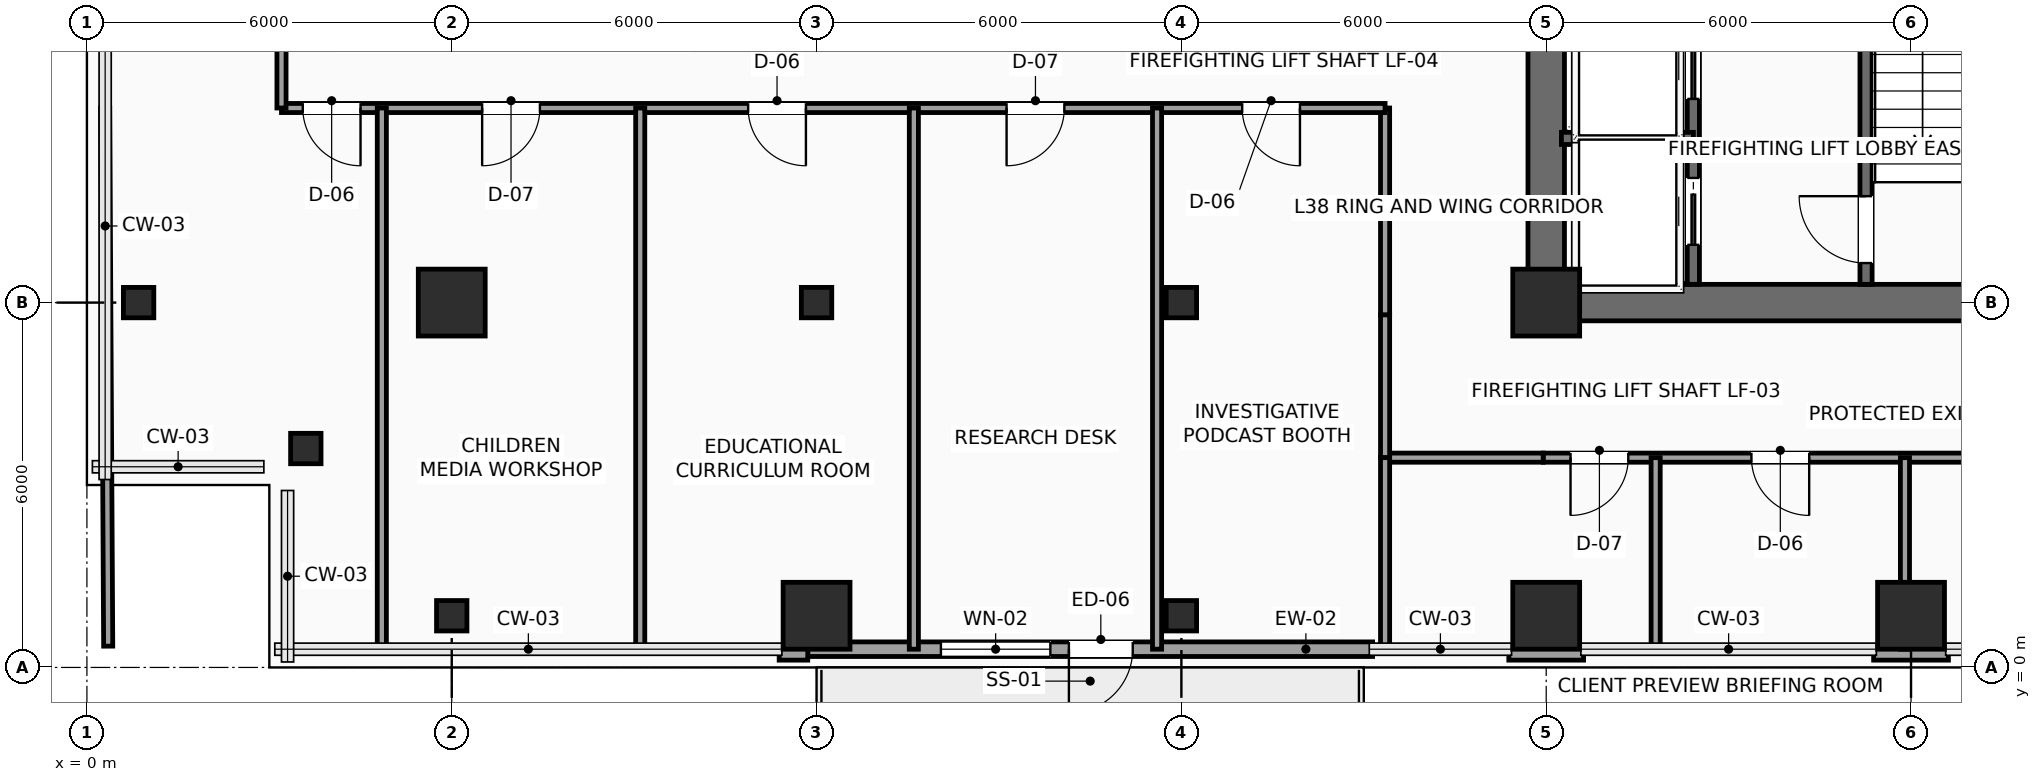
"""IFC4 building model, lengths in metres.
Left out: names, types, materials, properties, quantities, classifications, styles, units other than length and angle.
Written with IfcOpenShell. Run it as: python <this file> out.ifc"""

import sys

from ifc_helpers import new_model, si_unit, direction, frame, frame_2d, origin, origin_2d, place, context, subcontext, project, spatial, rectangle, hollow_rectangle, extrude, element, fill, save


model = new_model("IFC4")
c1 = context("Model", 3, precision=1e-05, world=origin(), true_north=direction((0.0, 1.0)))
c2 = subcontext(c1, "Body", "Model", "MODEL_VIEW")
j1 = project(units=[si_unit("LENGTHUNIT", "METRE"), si_unit("PLANEANGLEUNIT", "RADIAN")], contexts=[c1])
p1 = place(None, origin())
s1 = spatial("IfcSite", under=j1, at=p1, CompositionType="ELEMENT")
p2 = place(p1, origin())
s2 = spatial("IfcBuilding", under=s1, at=p2, CompositionType="ELEMENT")
p3 = place(p2, frame((0.0, 0.0, 156.9)))
s3 = spatial("IfcBuildingStorey", under=s2, at=p3, CompositionType="ELEMENT", Elevation=156.9)
p4 = place(p3, frame((24.0, 6.0, 0.0), z_axis=(0.0, 0.0, 1.0), x_axis=(1.0, 0.0, 0.0)))
e1 = element("IfcColumn", 1, at=p4, inside=s3, PredefinedType="COLUMN", context=c2, shape_type="SweptSolid", body=[
    extrude(rectangle(XDim=1.1, YDim=1.1, at=origin_2d()), origin(), (0.0, 0.0, 1.0), 3.75),
])
for number, where, z_axis, x_axis in (
    (2, (3.6, 3.6, 0.0), (0.0, 0.0, 1.0), (1.0, 0.0, 0.0)),
    (3, (0.85, 6.0, 0.0), (0.0, 0.0, 1.0), (1.0, 0.0, 0.0)),
    (4, (6.0, 0.85, 0.0), (0.0, 0.0, 1.0), (1.0, 0.0, 0.0)),
):
    element("IfcColumn", number, at=place(p3, frame(where, z_axis=z_axis, x_axis=x_axis)), inside=s3, PredefinedType="COLUMN", context=c2, shape_type="SweptSolid", body=[
        extrude(hollow_rectangle(XDim=0.5, YDim=0.5, WallThickness=0.025, InnerFilletRadius=0.025, OuterFilletRadius=0.04, at=origin_2d()), origin(), (0.0, 0.0, 1.0), 3.75),
    ])
for number, where, z_axis, x_axis in (
    (5, (6.0, 6.0, 0.0), (0.0, 0.0, 1.0), (1.0, 0.0, 0.0)),
    (6, (12.0, 0.85, 0.0), (0.0, 0.0, 1.0), (1.0, 0.0, 0.0)),
):
    element("IfcColumn", number, at=place(p3, frame(where, z_axis=z_axis, x_axis=x_axis)), inside=s3, PredefinedType="COLUMN", context=c2, shape_type="SweptSolid", body=[
        extrude(rectangle(XDim=1.1, YDim=1.1, at=origin_2d()), origin(), (0.0, 0.0, 1.0), 3.75),
    ])
for number, where, z_axis, x_axis in (
    (7, (12.0, 6.0, 0.0), (0.0, 0.0, 1.0), (1.0, 0.0, 0.0)),
    (8, (18.0, 0.85, 0.0), (0.0, 0.0, 1.0), (1.0, 0.0, 0.0)),
    (9, (18.0, 6.0, 0.0), (0.0, 0.0, 1.0), (1.0, 0.0, 0.0)),
):
    element("IfcColumn", number, at=place(p3, frame(where, z_axis=z_axis, x_axis=x_axis)), inside=s3, PredefinedType="COLUMN", context=c2, shape_type="SweptSolid", body=[
        extrude(hollow_rectangle(XDim=0.5, YDim=0.5, WallThickness=0.025, InnerFilletRadius=0.025, OuterFilletRadius=0.04, at=origin_2d()), origin(), (0.0, 0.0, 1.0), 3.75),
    ])
for number, where, z_axis, x_axis in (
    (10, (24.0, 0.85, 0.0), (0.0, 0.0, 1.0), (1.0, 0.0, 0.0)),
    (11, (30.0, 0.85, 0.0), (0.0, 0.0, 1.0), (1.0, 0.0, 0.0)),
):
    element("IfcColumn", number, at=place(p3, frame(where, z_axis=z_axis, x_axis=x_axis)), inside=s3, PredefinedType="COLUMN", context=c2, shape_type="SweptSolid", body=[
        extrude(rectangle(XDim=1.1, YDim=1.1, at=origin_2d()), origin(), (0.0, 0.0, 1.0), 3.75),
    ])
p5 = place(p3, frame((21.145, 0.3, 0.0), z_axis=(0.0, 0.0, 1.0), x_axis=(-1.0, 0.0, 0.0)))
e12 = element("IfcWall", 12, at=p5, inside=s3, PredefinedType="SOLIDWALL", context=c2, shape_type="SweptSolid", body=[
    extrude(rectangle(XDim=9.29, YDim=0.24, at=frame_2d((4.645, 0.0))), origin(), (0.0, 0.0, 1.0), 3.525),
])
p6 = place(p5, frame((3.945, 0.0, 0.0)))
e13 = element("IfcOpeningElement", 13, at=p6, cuts=e12, PredefinedType="OPENING", context=c2, shape_type="SweptSolid", body=[
    extrude(rectangle(XDim=1.05, YDim=2.2, at=frame_2d((0.525, 1.1))), frame((0.0, 0.13, 0.0), z_axis=(0.0, -1.0, 0.0), x_axis=(1.0, 0.0, 0.0)), (0.0, 0.0, 1.0), 0.26),
])
p7 = place(p5, frame((5.3, 0.0, 0.85)))
e14 = element("IfcOpeningElement", 14, at=p7, cuts=e12, PredefinedType="OPENING", context=c2, shape_type="SweptSolid", body=[
    extrude(rectangle(XDim=1.8, YDim=2.1, at=frame_2d((0.9, 1.05))), frame((0.0, 0.13, 0.0), z_axis=(0.0, -1.0, 0.0), x_axis=(1.0, 0.0, 0.0)), (0.0, 0.0, 1.0), 0.26),
])
for number, where, z_axis, x_axis in (
    (15, (30.615, 0.24, 0.0), (0.0, 0.0, 1.0), (-1.0, 0.0, 0.0)),
    (16, (24.615, 0.24, 0.0), (0.0, 0.0, 1.0), (-1.0, 0.0, 0.0)),
):
    element("IfcWall", number, at=place(p3, frame(where, z_axis=z_axis, x_axis=x_axis)), inside=s3, PredefinedType="SOLIDWALL", context=c2, shape_type="SweptSolid", body=[
        extrude(rectangle(XDim=1.23, YDim=0.24, at=frame_2d((0.615, 0.0))), origin(), (0.0, 0.0, 1.0), 3.525),
    ])
p8 = place(p3, frame((11.855, 0.24, 0.0), z_axis=(0.0, 0.0, 1.0), x_axis=(-1.0, 0.0, 0.0)))
e17 = element("IfcWall", 17, at=p8, inside=s3, PredefinedType="SOLIDWALL", context=c2, shape_type="SweptSolid", body=[
    extrude(rectangle(XDim=0.47, YDim=0.24, at=frame_2d((0.235, 0.0))), origin(), (0.0, 0.0, 1.0), 3.525),
])
p9 = place(p3, frame((24.0, 6.0, 0.0), z_axis=(0.0, 0.0, 1.0), x_axis=(1.0, 0.0, 0.0)))
e18 = element("IfcWall", 18, at=p9, inside=s3, PredefinedType="SHEAR", context=c2, shape_type="SweptSolid", body=[
    extrude(rectangle(XDim=9.6, YDim=0.6, at=frame_2d((4.8, 0.0))), origin(), (0.0, 0.0, 1.0), 3.525),
])
p10 = place(p3, frame((24.0, 6.0, 0.0), z_axis=(0.0, 0.0, 1.0), x_axis=(0.0, 1.0, 0.0)))
e19 = element("IfcWall", 19, at=p10, inside=s3, PredefinedType="SHEAR", context=c2, shape_type="SweptSolid", body=[
    extrude(rectangle(XDim=12.0, YDim=0.6, at=frame_2d((6.0, 0.0))), origin(), (0.0, 0.0, 1.0), 3.525),
])
p11 = place(p10, frame((7.15, 0.0, 0.0)))
e20 = element("IfcOpeningElement", 20, at=p11, cuts=e19, PredefinedType="OPENING", context=c2, shape_type="SweptSolid", body=[
    extrude(rectangle(XDim=1.6, YDim=2.3, at=frame_2d((0.8, 1.15))), frame((0.0, 0.31, 0.0), z_axis=(0.0, -1.0, 0.0), x_axis=(1.0, 0.0, 0.0)), (0.0, 0.0, 1.0), 0.62),
])
p12 = place(p3, frame((29.26, 6.3, 0.0), z_axis=(0.0, 0.0, 1.0), x_axis=(0.0, 1.0, 0.0)))
e21 = element("IfcWall", 21, at=p12, inside=s3, PredefinedType="SHEAR", context=c2, shape_type="SweptSolid", body=[
    extrude(rectangle(XDim=8.88, YDim=0.2, at=frame_2d((4.44, 0.0))), origin(), (0.0, 0.0, 1.0), 3.525),
])
p13 = place(p12, frame((0.35, 0.0, 0.0)))
e22 = element("IfcOpeningElement", 22, at=p13, cuts=e21, PredefinedType="OPENING", context=c2, shape_type="SweptSolid", body=[
    extrude(rectangle(XDim=1.1, YDim=2.2, at=frame_2d((0.55, 1.1))), frame((0.0, 0.11, 0.0), z_axis=(0.0, -1.0, 0.0), x_axis=(1.0, 0.0, 0.0)), (0.0, 0.0, 1.0), 0.22),
])
p14 = place(p3, frame((26.42, 6.3, 0.0), z_axis=(0.0, 0.0, 1.0), x_axis=(0.0, 1.0, 0.0)))
e23 = element("IfcWall", 23, at=p14, inside=s3, PredefinedType="SHEAR", context=c2, shape_type="SweptSolid", body=[
    extrude(rectangle(XDim=4.95, YDim=0.2, at=frame_2d((2.475, 0.0))), origin(), (0.0, 0.0, 1.0), 3.525),
])
p15 = place(p14, frame((0.65, 0.0, 0.0)))
e24 = element("IfcOpeningElement", 24, at=p15, cuts=e23, PredefinedType="OPENING", context=c2, shape_type="SweptSolid", body=[
    extrude(rectangle(XDim=1.1, YDim=2.2, at=frame_2d((0.55, 1.1))), frame((0.0, 0.11, 0.0), z_axis=(0.0, -1.0, 0.0), x_axis=(1.0, 0.0, 0.0)), (0.0, 0.0, 1.0), 0.22),
])
p16 = place(p14, frame((3.05, 0.0, 0.0)))
e25 = element("IfcOpeningElement", 25, at=p16, cuts=e23, PredefinedType="OPENING", context=c2, shape_type="SweptSolid", body=[
    extrude(rectangle(XDim=1.1, YDim=2.2, at=frame_2d((0.55, 1.1))), frame((0.0, 0.11, 0.0), z_axis=(0.0, -1.0, 0.0), x_axis=(1.0, 0.0, 0.0)), (0.0, 0.0, 1.0), 0.22),
])
p17 = place(p3, frame((24.25, 8.7, 0.0), z_axis=(0.0, 0.0, 1.0), x_axis=(1.0, 0.0, 0.0)))
e26 = element("IfcWall", 26, at=p17, inside=s3, PredefinedType="SHEAR", context=c2, shape_type="SweptSolid", body=[
    extrude(rectangle(XDim=2.17, YDim=0.2, at=frame_2d((1.085, 0.0))), origin(), (0.0, 0.0, 1.0), 3.525),
])
p18 = place(p3, frame((36.15, 3.45, 0.0), z_axis=(0.0, 0.0, 1.0), x_axis=(-1.0, 0.0, 0.0)))
e27 = element("IfcWall", 27, at=p18, inside=s3, PredefinedType="PARTITIONING", context=c2, shape_type="SweptSolid", body=[
    extrude(rectangle(XDim=12.2, YDim=0.15, at=frame_2d((6.1, 0.0))), origin(), (0.0, 0.0, 1.0), 3.067),
])
p19 = place(p18, frame((10.8, 0.0, 0.0)))
e28 = element("IfcOpeningElement", 28, at=p19, cuts=e27, PredefinedType="OPENING", context=c2, shape_type="SweptSolid", body=[
    extrude(rectangle(XDim=0.95, YDim=2.15, at=frame_2d((0.475, 1.075))), frame((0.0, 0.085, 0.0), z_axis=(0.0, -1.0, 0.0), x_axis=(1.0, 0.0, 0.0)), (0.0, 0.0, 1.0), 0.17),
])
p20 = place(p18, frame((7.825, 0.0, 0.0)))
e29 = element("IfcOpeningElement", 29, at=p20, cuts=e27, PredefinedType="OPENING", context=c2, shape_type="SweptSolid", body=[
    extrude(rectangle(XDim=0.95, YDim=2.15, at=frame_2d((0.475, 1.075))), frame((0.0, 0.085, 0.0), z_axis=(0.0, -1.0, 0.0), x_axis=(1.0, 0.0, 0.0)), (0.0, 0.0, 1.0), 0.17),
])
p21 = place(p18, frame((3.675, 0.0, 0.0)))
e30 = element("IfcOpeningElement", 30, at=p21, cuts=e27, PredefinedType="OPENING", context=c2, shape_type="SweptSolid", body=[
    extrude(rectangle(XDim=0.95, YDim=2.15, at=frame_2d((0.475, 1.075))), frame((0.0, 0.085, 0.0), z_axis=(0.0, -1.0, 0.0), x_axis=(1.0, 0.0, 0.0)), (0.0, 0.0, 1.0), 0.17),
])
p22 = place(p3, frame((23.95, 3.45, 0.0), z_axis=(0.0, 0.0, 1.0), x_axis=(-1.0, 0.0, 0.0)))
e31 = element("IfcWall", 31, at=p22, inside=s3, PredefinedType="PARTITIONING", context=c2, shape_type="SweptSolid", body=[
    extrude(rectangle(XDim=2.6, YDim=0.15, at=frame_2d((1.3, 0.0))), origin(), (0.0, 0.0, 1.0), 3.067),
])
p23 = place(p3, frame((21.35, 3.45, 0.0), z_axis=(0.0, 0.0, 1.0), x_axis=(0.0, 1.0, 0.0)))
e32 = element("IfcWall", 32, at=p23, inside=s3, PredefinedType="PARTITIONING", context=c2, shape_type="SweptSolid", body=[
    extrude(rectangle(XDim=2.35, YDim=0.15, at=frame_2d((1.175, 0.0))), origin(), (0.0, 0.0, 1.0), 3.525),
])
p24 = place(p3, frame((21.35, 5.8, 0.0), z_axis=(0.0, 0.0, 1.0), x_axis=(0.0, 1.0, 0.0)))
e33 = element("IfcWall", 33, at=p24, inside=s3, PredefinedType="PARTITIONING", context=c2, shape_type="SweptSolid", body=[
    extrude(rectangle(XDim=3.4, YDim=0.15, at=frame_2d((1.7, 0.0))), origin(), (0.0, 0.0, 1.0), 3.525),
])
p25 = place(p3, frame((21.35, 9.2, 0.0), z_axis=(0.0, 0.0, 1.0), x_axis=(-1.0, 0.0, 0.0)))
e34 = element("IfcWall", 34, at=p25, inside=s3, PredefinedType="PARTITIONING", context=c2, shape_type="SweptSolid", body=[
    extrude(rectangle(XDim=18.15, YDim=0.15, at=frame_2d((9.075, 0.0))), origin(), (0.0, 0.0, 1.0), 3.067),
])
p26 = place(p25, frame((16.85, 0.0, 0.0)))
e35 = element("IfcOpeningElement", 35, at=p26, cuts=e34, PredefinedType="OPENING", context=c2, shape_type="SweptSolid", body=[
    extrude(rectangle(XDim=0.95, YDim=2.15, at=frame_2d((0.475, 1.075))), frame((0.0, 0.085, 0.0), z_axis=(0.0, -1.0, 0.0), x_axis=(1.0, 0.0, 0.0)), (0.0, 0.0, 1.0), 0.17),
])
p27 = place(p25, frame((13.9, 0.0, 0.0)))
e36 = element("IfcOpeningElement", 36, at=p27, cuts=e34, PredefinedType="OPENING", context=c2, shape_type="SweptSolid", body=[
    extrude(rectangle(XDim=0.95, YDim=2.15, at=frame_2d((0.475, 1.075))), frame((0.0, 0.085, 0.0), z_axis=(0.0, -1.0, 0.0), x_axis=(1.0, 0.0, 0.0)), (0.0, 0.0, 1.0), 0.17),
])
p28 = place(p25, frame((9.525, 0.0, 0.0)))
e37 = element("IfcOpeningElement", 37, at=p28, cuts=e34, PredefinedType="OPENING", context=c2, shape_type="SweptSolid", body=[
    extrude(rectangle(XDim=0.95, YDim=2.15, at=frame_2d((0.475, 1.075))), frame((0.0, 0.085, 0.0), z_axis=(0.0, -1.0, 0.0), x_axis=(1.0, 0.0, 0.0)), (0.0, 0.0, 1.0), 0.17),
])
p29 = place(p25, frame((5.275, 0.0, 0.0)))
e38 = element("IfcOpeningElement", 38, at=p29, cuts=e34, PredefinedType="OPENING", context=c2, shape_type="SweptSolid", body=[
    extrude(rectangle(XDim=0.95, YDim=2.15, at=frame_2d((0.475, 1.075))), frame((0.0, 0.085, 0.0), z_axis=(0.0, -1.0, 0.0), x_axis=(1.0, 0.0, 0.0)), (0.0, 0.0, 1.0), 0.17),
])
p30 = place(p25, frame((1.4, 0.0, 0.0)))
e39 = element("IfcOpeningElement", 39, at=p30, cuts=e34, PredefinedType="OPENING", context=c2, shape_type="SweptSolid", body=[
    extrude(rectangle(XDim=0.95, YDim=2.15, at=frame_2d((0.475, 1.075))), frame((0.0, 0.085, 0.0), z_axis=(0.0, -1.0, 0.0), x_axis=(1.0, 0.0, 0.0)), (0.0, 0.0, 1.0), 0.17),
])
p31 = place(p3, frame((3.2, 9.2, 0.0), z_axis=(0.0, 0.0, 1.0), x_axis=(0.0, 1.0, 0.0)))
e40 = element("IfcWall", 40, at=p31, inside=s3, PredefinedType="PARTITIONING", context=c2, shape_type="SweptSolid", body=[
    extrude(rectangle(XDim=2.05, YDim=0.15, at=frame_2d((1.025, 0.0))), origin(), (0.0, 0.0, 1.0), 3.525),
])
for number, where, z_axis, x_axis in (
    (41, (21.35, 0.3, 0.0), (0.0, 0.0, 1.0), (0.0, 1.0, 0.0)),
    (42, (25.8, 0.3, 0.0), (0.0, 0.0, 1.0), (0.0, 1.0, 0.0)),
    (43, (29.9, 0.3, 0.0), (0.0, 0.0, 1.0), (0.0, 1.0, 0.0)),
):
    element("IfcWall", number, at=place(p3, frame(where, z_axis=z_axis, x_axis=x_axis)), inside=s3, PredefinedType="PARTITIONING", context=c2, shape_type="SweptSolid", body=[
        extrude(rectangle(XDim=3.15, YDim=0.15, at=frame_2d((1.575, 0.0))), origin(), (0.0, 0.0, 1.0), 3.525),
    ])
p32 = place(p3, frame((0.35, 0.35, 0.0), z_axis=(0.0, 0.0, 1.0), x_axis=(-0.005655237989, 0.999984009014, 0.0)))
e44 = element("IfcWall", 44, at=p32, inside=s3, PredefinedType="PARTITIONING", context=c2, shape_type="SweptSolid", body=[
    extrude(rectangle(XDim=8.85, YDim=0.15, at=frame_2d((4.425, 0.0))), origin(), (0.0, 0.0, 1.0), 3.525),
])
for number, where, z_axis, x_axis in (
    (45, (4.85, 0.3, 0.0), (0.0, 0.0, 1.0), (0.0, 1.0, 0.0)),
    (46, (9.1, 0.3, 0.0), (0.0, 0.0, 1.0), (0.0, 1.0, 0.0)),
    (47, (13.6, 0.3, 0.0), (0.0, 0.0, 1.0), (0.0, 1.0, 0.0)),
    (48, (17.6, 0.3, 0.0), (0.0, 0.0, 1.0), (0.0, 1.0, 0.0)),
):
    element("IfcWall", number, at=place(p3, frame(where, z_axis=z_axis, x_axis=x_axis)), inside=s3, PredefinedType="PARTITIONING", context=c2, shape_type="SweptSolid", body=[
        extrude(rectangle(XDim=8.9, YDim=0.15, at=frame_2d((4.45, 0.0))), origin(), (0.0, 0.0, 1.0), 3.525),
    ])
p33 = place(p6, origin())
e49 = element("IfcDoor", 49, at=p33, inside=s3, OperationType="SINGLE_SWING_RIGHT", PredefinedType="DOOR", context=c2, shape_type="SweptSolid", body=[
    extrude(rectangle(XDim=1.05, YDim=2.2, at=frame_2d((0.525, 1.1))), frame((0.0, 0.025, 0.0), z_axis=(0.0, -1.0, 0.0), x_axis=(1.0, 0.0, 0.0)), (0.0, 0.0, 1.0), 0.05),
])
fill(e13, e49)
p34 = place(p7, origin())
e50 = element("IfcWindow", 50, at=p34, inside=s3, PartitioningType="SINGLE_PANEL", PredefinedType="WINDOW", context=c2, shape_type="SweptSolid", body=[
    extrude(rectangle(XDim=1.8, YDim=2.1, at=frame_2d((0.9, 1.05))), frame((0.0, 0.03, 0.0), z_axis=(0.0, -1.0, 0.0), x_axis=(1.0, 0.0, 0.0)), (0.0, 0.0, 1.0), 0.06),
])
fill(e14, e50)
p35 = place(p13, origin())
e51 = element("IfcDoor", 51, at=p35, inside=s3, OperationType="SINGLE_SWING_RIGHT", PredefinedType="DOOR", context=c2, shape_type="SweptSolid", body=[
    extrude(rectangle(XDim=1.1, YDim=2.2, at=frame_2d((0.55, 1.1))), frame((0.0, 0.025, 0.0), z_axis=(0.0, -1.0, 0.0), x_axis=(1.0, 0.0, 0.0)), (0.0, 0.0, 1.0), 0.05),
])
fill(e22, e51)
p36 = place(p15, origin())
e52 = element("IfcDoor", 52, at=p36, inside=s3, OperationType="SLIDING_TO_LEFT", PredefinedType="DOOR", context=c2, shape_type="SweptSolid", body=[
    extrude(rectangle(XDim=1.1, YDim=2.2, at=frame_2d((0.55, 1.1))), frame((0.0, 0.025, 0.0), z_axis=(0.0, -1.0, 0.0), x_axis=(1.0, 0.0, 0.0)), (0.0, 0.0, 1.0), 0.05),
])
fill(e24, e52)
p37 = place(p16, origin())
e53 = element("IfcDoor", 53, at=p37, inside=s3, OperationType="SLIDING_TO_LEFT", PredefinedType="DOOR", context=c2, shape_type="SweptSolid", body=[
    extrude(rectangle(XDim=1.1, YDim=2.2, at=frame_2d((0.55, 1.1))), frame((0.0, 0.025, 0.0), z_axis=(0.0, -1.0, 0.0), x_axis=(1.0, 0.0, 0.0)), (0.0, 0.0, 1.0), 0.05),
])
fill(e25, e53)
p38 = place(p19, origin())
e54 = element("IfcDoor", 54, at=p38, inside=s3, OperationType="SINGLE_SWING_RIGHT", PredefinedType="DOOR", context=c2, shape_type="SweptSolid", body=[
    extrude(rectangle(XDim=0.95, YDim=2.15, at=frame_2d((0.475, 1.075))), frame((0.0, 0.025, 0.0), z_axis=(0.0, -1.0, 0.0), x_axis=(1.0, 0.0, 0.0)), (0.0, 0.0, 1.0), 0.05),
])
fill(e28, e54)
p39 = place(p20, origin())
e55 = element("IfcDoor", 55, at=p39, inside=s3, OperationType="SINGLE_SWING_LEFT", PredefinedType="DOOR", context=c2, shape_type="SweptSolid", body=[
    extrude(rectangle(XDim=0.95, YDim=2.15, at=frame_2d((0.475, 1.075))), frame((0.0, 0.025, 0.0), z_axis=(0.0, -1.0, 0.0), x_axis=(1.0, 0.0, 0.0)), (0.0, 0.0, 1.0), 0.05),
])
fill(e29, e55)
p40 = place(p26, origin())
e56 = element("IfcDoor", 56, at=p40, inside=s3, OperationType="SINGLE_SWING_LEFT", PredefinedType="DOOR", context=c2, shape_type="SweptSolid", body=[
    extrude(rectangle(XDim=0.95, YDim=2.15, at=frame_2d((0.475, 1.075))), frame((0.0, 0.025, 0.0), z_axis=(0.0, -1.0, 0.0), x_axis=(1.0, 0.0, 0.0)), (0.0, 0.0, 1.0), 0.05),
])
fill(e35, e56)
p41 = place(p27, origin())
e57 = element("IfcDoor", 57, at=p41, inside=s3, OperationType="SINGLE_SWING_RIGHT", PredefinedType="DOOR", context=c2, shape_type="SweptSolid", body=[
    extrude(rectangle(XDim=0.95, YDim=2.15, at=frame_2d((0.475, 1.075))), frame((0.0, 0.025, 0.0), z_axis=(0.0, -1.0, 0.0), x_axis=(1.0, 0.0, 0.0)), (0.0, 0.0, 1.0), 0.05),
])
fill(e36, e57)
p42 = place(p28, origin())
e58 = element("IfcDoor", 58, at=p42, inside=s3, OperationType="SINGLE_SWING_LEFT", PredefinedType="DOOR", context=c2, shape_type="SweptSolid", body=[
    extrude(rectangle(XDim=0.95, YDim=2.15, at=frame_2d((0.475, 1.075))), frame((0.0, 0.025, 0.0), z_axis=(0.0, -1.0, 0.0), x_axis=(1.0, 0.0, 0.0)), (0.0, 0.0, 1.0), 0.05),
])
fill(e37, e58)
p43 = place(p29, origin())
e59 = element("IfcDoor", 59, at=p43, inside=s3, OperationType="SINGLE_SWING_RIGHT", PredefinedType="DOOR", context=c2, shape_type="SweptSolid", body=[
    extrude(rectangle(XDim=0.95, YDim=2.15, at=frame_2d((0.475, 1.075))), frame((0.0, 0.025, 0.0), z_axis=(0.0, -1.0, 0.0), x_axis=(1.0, 0.0, 0.0)), (0.0, 0.0, 1.0), 0.05),
])
fill(e38, e59)
p44 = place(p30, origin())
e60 = element("IfcDoor", 60, at=p44, inside=s3, OperationType="SINGLE_SWING_LEFT", PredefinedType="DOOR", context=c2, shape_type="SweptSolid", body=[
    extrude(rectangle(XDim=0.95, YDim=2.15, at=frame_2d((0.475, 1.075))), frame((0.0, 0.025, 0.0), z_axis=(0.0, -1.0, 0.0), x_axis=(1.0, 0.0, 0.0)), (0.0, 0.0, 1.0), 0.05),
])
fill(e39, e60)
save(model, sys.argv[1])
